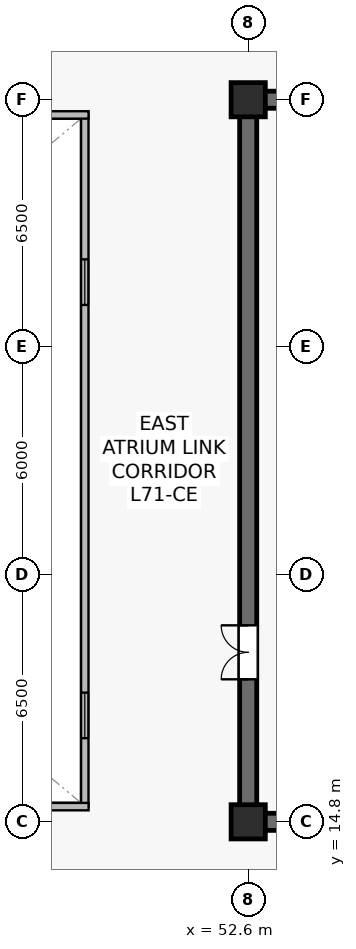
"""IFC4 building model, lengths in metres.
Left out: names, types, materials, properties, quantities, classifications, styles, units other than length and angle.
Written with IfcOpenShell. Run it as: python <this file> out.ifc"""

import sys

from ifc_helpers import new_model, si_unit, direction, frame, frame_2d, origin, origin_2d, place, context, subcontext, project, spatial, rectangle, extrude, source, transform, mapped, element, fill, save


model = new_model("IFC4")
c1 = context("Model", 3, precision=1e-05, world=origin(), true_north=direction((0.0, 1.0)))
c2 = subcontext(c1, "Body", "Model", "MODEL_VIEW")
j1 = project(units=[si_unit("LENGTHUNIT", "METRE"), si_unit("PLANEANGLEUNIT", "RADIAN")], contexts=[c1])
p1 = place(None, origin())
s1 = spatial("IfcSite", under=j1, at=p1, CompositionType="ELEMENT")
p2 = place(p1, origin())
s2 = spatial("IfcBuilding", under=s1, at=p2, CompositionType="ELEMENT")
p3 = place(p2, frame((0.0, 0.0, 297.6)))
s3 = spatial("IfcBuildingStorey", under=s2, at=p3, CompositionType="ELEMENT", Elevation=297.6)
p4 = place(p3, frame((52.375, 14.8, 0.0), z_axis=(0.0, 0.0, 1.0), x_axis=(1.0, 0.0, 0.0)))
e1 = element("IfcWall", 1, at=p4, inside=s3, PredefinedType="SHEAR", context=c2, shape_type="SweptSolid", body=[
    extrude(rectangle(XDim=15.25, YDim=0.45, at=frame_2d((7.625, 0.0))), origin(), (0.0, 0.0, 1.0), 3.9),
])
p5 = place(p3, frame((52.375, 33.8, 0.0), z_axis=(0.0, 0.0, 1.0), x_axis=(1.0, 0.0, 0.0)))
e2 = element("IfcWall", 2, at=p5, inside=s3, PredefinedType="SHEAR", context=c2, shape_type="SweptSolid", body=[
    extrude(rectangle(XDim=15.25, YDim=0.45, at=frame_2d((7.625, 0.0))), origin(), (0.0, 0.0, 1.0), 3.9),
])
p6 = place(p5, frame((9.15, 0.0, 0.0)))
e3 = element("IfcOpeningElement", 3, at=p6, cuts=e2, PredefinedType="OPENING", context=c2, shape_type="SweptSolid", body=[
    extrude(rectangle(XDim=0.95, YDim=2.15, at=frame_2d((0.475, 1.075))), frame((0.0, 0.235, 0.0), z_axis=(0.0, -1.0, 0.0), x_axis=(1.0, 0.0, 0.0)), (0.0, 0.0, 1.0), 0.47),
])
p7 = place(p5, frame((6.635, 0.0, 0.0)))
e4 = element("IfcOpeningElement", 4, at=p7, cuts=e2, PredefinedType="OPENING", context=c2, shape_type="SweptSolid", body=[
    extrude(rectangle(XDim=0.95, YDim=2.15, at=frame_2d((0.475, 1.075))), frame((0.0, 0.235, 0.0), z_axis=(0.0, -1.0, 0.0), x_axis=(1.0, 0.0, 0.0)), (0.0, 0.0, 1.0), 0.47),
])
p8 = place(p5, frame((4.085, 0.0, 0.0)))
e5 = element("IfcOpeningElement", 5, at=p8, cuts=e2, PredefinedType="OPENING", context=c2, shape_type="SweptSolid", body=[
    extrude(rectangle(XDim=0.95, YDim=2.15, at=frame_2d((0.475, 1.075))), frame((0.0, 0.235, 0.0), z_axis=(0.0, -1.0, 0.0), x_axis=(1.0, 0.0, 0.0)), (0.0, 0.0, 1.0), 0.47),
])
p9 = place(p5, frame((1.535, 0.0, 0.0)))
e6 = element("IfcOpeningElement", 6, at=p9, cuts=e2, PredefinedType="OPENING", context=c2, shape_type="SweptSolid", body=[
    extrude(rectangle(XDim=0.95, YDim=2.15, at=frame_2d((0.475, 1.075))), frame((0.0, 0.235, 0.0), z_axis=(0.0, -1.0, 0.0), x_axis=(1.0, 0.0, 0.0)), (0.0, 0.0, 1.0), 0.47),
])
p10 = place(p3, frame((52.6, 15.025, 0.0), z_axis=(0.0, 0.0, 1.0), x_axis=(0.0, 1.0, 0.0)))
e7 = element("IfcWall", 7, at=p10, inside=s3, PredefinedType="SHEAR", context=c2, shape_type="SweptSolid", body=[
    extrude(rectangle(XDim=18.55, YDim=0.45, at=frame_2d((9.275, 0.0))), origin(), (0.0, 0.0, 1.0), 3.9),
])
p11 = place(p10, frame((3.525, 0.0, 0.0)))
e8 = element("IfcOpeningElement", 8, at=p11, cuts=e7, PredefinedType="OPENING", context=c2, shape_type="SweptSolid", body=[
    extrude(rectangle(XDim=1.42, YDim=2.2, at=frame_2d((0.71, 1.1))), frame((0.0, 0.235, 0.0), z_axis=(0.0, -1.0, 0.0), x_axis=(1.0, 0.0, 0.0)), (0.0, 0.0, 1.0), 0.47),
])
m1 = source(origin(), c2, "Body", "SweptSolid", [
    extrude(rectangle(XDim=0.9, YDim=0.9, at=origin_2d()), origin(), (0.0, 0.0, 1.0), 4.2),
])
for number, where, z_axis, x_axis in (
    (9, (52.6, 14.8, 0.0), (0.0, 0.0, 1.0), (1.0, 0.0, 0.0)),
    (10, (52.6, 33.8, 0.0), (0.0, 0.0, 1.0), (1.0, 0.0, 0.0)),
):
    element("IfcColumn", number, at=place(p3, frame(where, z_axis=z_axis, x_axis=x_axis)), inside=s3, PredefinedType="COLUMN", context=c2, shape_type="MappedRepresentation", body=[
        mapped(m1, transform((0.0, 0.0, 0.0), scale=1.0)),
    ])
p12 = place(p3, frame((48.3, 15.2, 0.0), z_axis=(0.0, 0.0, 1.0), x_axis=(0.0, 1.0, 0.0)))
e11 = element("IfcWall", 11, at=p12, inside=s3, PredefinedType="SOLIDWALL", context=c2, shape_type="SweptSolid", body=[
    extrude(rectangle(XDim=18.2, YDim=0.195, at=frame_2d((9.1, 0.0))), origin(), (0.0, 0.0, 1.0), 3.9),
])
p13 = place(p12, frame((1.8, 0.0, 0.9)))
e12 = element("IfcOpeningElement", 12, at=p13, cuts=e11, PredefinedType="OPENING", context=c2, shape_type="SweptSolid", body=[
    extrude(rectangle(XDim=1.2, YDim=1.35, at=frame_2d((0.6, 0.675))), frame((0.0, 0.107, 0.0), z_axis=(0.0, -1.0, 0.0), x_axis=(1.0, 0.0, 0.0)), (0.0, 0.0, 1.0), 0.215),
])
p14 = place(p12, frame((13.2, 0.0, 0.9)))
e13 = element("IfcOpeningElement", 13, at=p14, cuts=e11, PredefinedType="OPENING", context=c2, shape_type="SweptSolid", body=[
    extrude(rectangle(XDim=1.2, YDim=1.35, at=frame_2d((0.6, 0.675))), frame((0.0, 0.107, 0.0), z_axis=(0.0, -1.0, 0.0), x_axis=(1.0, 0.0, 0.0)), (0.0, 0.0, 1.0), 0.215),
])
for number, where, z_axis, x_axis in (
    (14, (26.4, 15.2, 0.0), (0.0, 0.0, 1.0), (1.0, 0.0, 0.0)),
    (15, (26.4, 33.4, 0.0), (0.0, 0.0, 1.0), (1.0, 0.0, 0.0)),
):
    element("IfcWall", number, at=place(p3, frame(where, z_axis=z_axis, x_axis=x_axis)), inside=s3, PredefinedType="SOLIDWALL", context=c2, shape_type="SweptSolid", body=[
        extrude(rectangle(XDim=22.0, YDim=0.195, at=frame_2d((11.0, 0.0))), origin(), (0.0, 0.0, 1.0), 3.9),
    ])
m2 = source(origin(), c2, "Body", "SweptSolid", [
    extrude(rectangle(XDim=1.2, YDim=1.35, at=frame_2d((0.6, 0.675))), frame((0.0, 0.03, 0.0), z_axis=(0.0, -1.0, 0.0), x_axis=(1.0, 0.0, 0.0)), (0.0, 0.0, 1.0), 0.06),
])
p15 = place(p13, origin())
e16 = element("IfcWindow", 16, at=p15, inside=s3, PartitioningType="SINGLE_PANEL", PredefinedType="WINDOW", context=c2, shape_type="MappedRepresentation", body=[
    mapped(m2, transform((0.0, 0.0, 0.0), scale=1.0)),
])
fill(e12, e16)
p16 = place(p14, origin())
e17 = element("IfcWindow", 17, at=p16, inside=s3, PartitioningType="SINGLE_PANEL", PredefinedType="WINDOW", context=c2, shape_type="MappedRepresentation", body=[
    mapped(m2, transform((0.0, 0.0, 0.0), scale=1.0)),
])
fill(e13, e17)
m3 = source(origin(), c2, "Body", "SweptSolid", [
    extrude(rectangle(XDim=1.42, YDim=2.2, at=frame_2d((0.71, 1.1))), frame((0.0, 0.025, 0.0), z_axis=(0.0, -1.0, 0.0), x_axis=(1.0, 0.0, 0.0)), (0.0, 0.0, 1.0), 0.05),
])
p17 = place(p11, origin())
e18 = element("IfcDoor", 18, at=p17, inside=s3, OperationType="DOUBLE_DOOR_SINGLE_SWING", PredefinedType="DOOR", context=c2, shape_type="MappedRepresentation", body=[
    mapped(m3, transform((0.0, 0.0, 0.0), scale=1.0)),
])
fill(e8, e18)
save(model, sys.argv[1])
